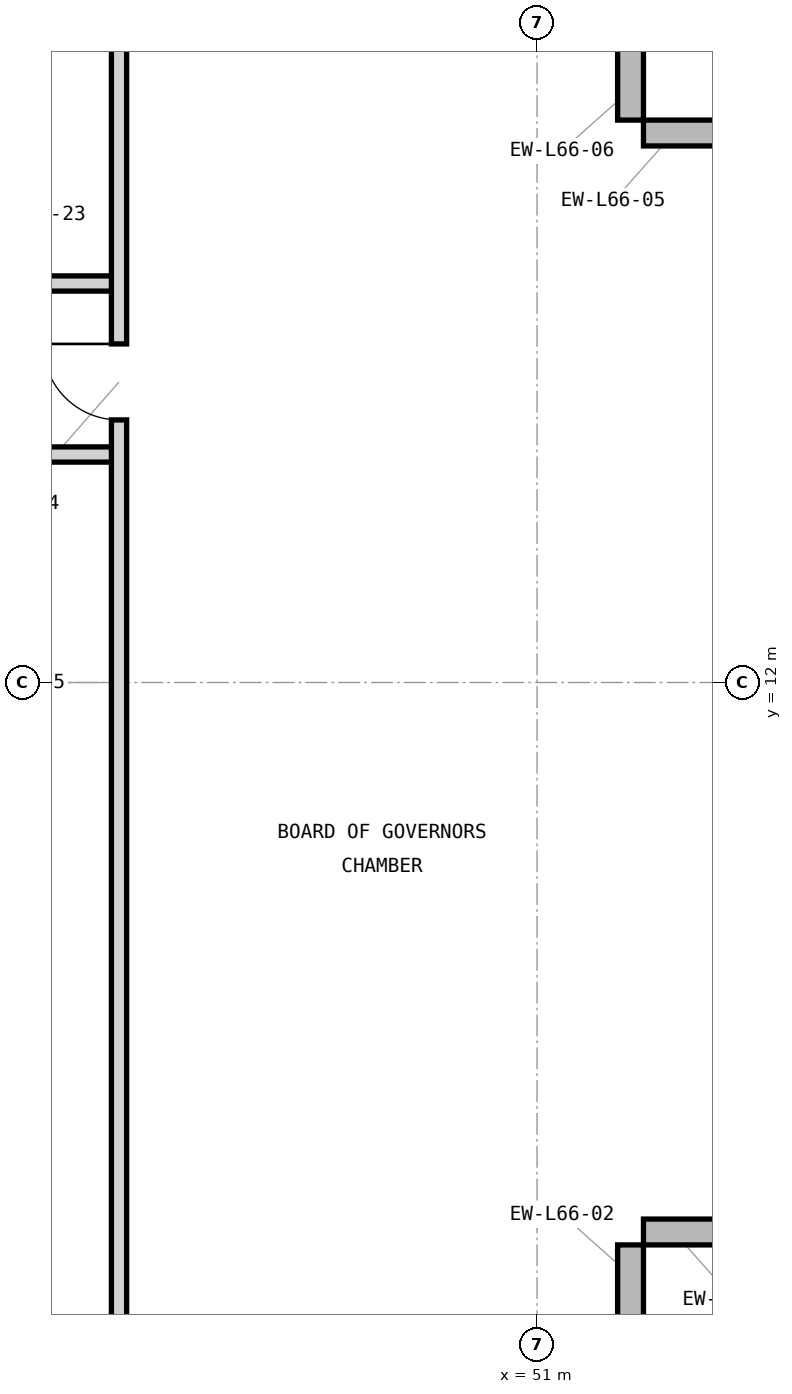
"""IFC4 building model, lengths in metres.
Left out: names, types, materials, properties, quantities, classifications, styles, units other than length and angle.
Written with IfcOpenShell. Run it as: python <this file> out.ifc"""

import sys

from ifc_helpers import new_model, si_unit, direction, frame, frame_2d, origin, place, context, subcontext, project, spatial, rectangle, extrude, element, fill, save


model = new_model("IFC4")
c1 = context("Model", 3, precision=1e-05, world=origin(), true_north=direction((0.0, 1.0)))
c2 = subcontext(c1, "Body", "Model", "MODEL_VIEW")
j1 = project(units=[si_unit("LENGTHUNIT", "METRE"), si_unit("PLANEANGLEUNIT", "RADIAN")], contexts=[c1])
p1 = place(None, origin())
s1 = spatial("IfcSite", under=j1, at=p1, CompositionType="ELEMENT")
p2 = place(p1, origin())
s2 = spatial("IfcBuilding", under=s1, at=p2, CompositionType="ELEMENT")
p3 = place(p2, frame((0.0, 0.0, 270.3)))
s3 = spatial("IfcBuildingStorey", under=s2, at=p3, CompositionType="ELEMENT", Elevation=270.3)
for number, where, z_axis, x_axis in (
    (1, (52.23, 3.0, 0.0), (0.0, 0.0, 1.0), (0.0, 1.0, 0.0)),
    (2, (52.4, 4.77, 0.0), (0.0, 0.0, 1.0), (1.0, 0.0, 0.0)),
    (3, (54.0, 19.23, 0.0), (0.0, 0.0, 1.0), (-1.0, 0.0, 0.0)),
    (4, (52.23, 19.4, 0.0), (0.0, 0.0, 1.0), (0.0, 1.0, 0.0)),
):
    element("IfcWall", number, at=place(p3, frame(where, z_axis=z_axis, x_axis=x_axis)), inside=s3, PredefinedType="STANDARD", context=c2, shape_type="SweptSolid", body=[
        extrude(rectangle(XDim=1.6, YDim=0.34, at=frame_2d((0.8, 0.0))), origin(), (0.0, 0.0, 1.0), 3.715),
    ])
p4 = place(p3, frame((37.7, 15.0, 0.0), z_axis=(0.0, 0.0, 1.0), x_axis=(1.0, 0.0, 0.0)))
e5 = element("IfcWall", 5, at=p4, inside=s3, PredefinedType="PARTITIONING", context=c2, shape_type="SweptSolid", body=[
    extrude(rectangle(XDim=7.8, YDim=0.2, at=frame_2d((3.9, 0.0))), origin(), (0.0, 0.0, 1.0), 3.301),
])
p5 = place(p4, frame((3.4, 0.0, 0.0)))
e6 = element("IfcOpeningElement", 6, at=p5, cuts=e5, PredefinedType="OPENING", context=c2, shape_type="SweptSolid", body=[
    extrude(rectangle(XDim=1.0, YDim=2.15, at=frame_2d((0.5, 1.075))), frame((0.0, 0.11, 0.0), z_axis=(0.0, -1.0, 0.0), x_axis=(1.0, 0.0, 0.0)), (0.0, 0.0, 1.0), 0.22),
])
p6 = place(p3, frame((40.2, 17.25, 0.0), z_axis=(0.0, 0.0, 1.0), x_axis=(1.0, 0.0, 0.0)))
e7 = element("IfcWall", 7, at=p6, inside=s3, PredefinedType="PARTITIONING", context=c2, shape_type="SweptSolid", body=[
    extrude(rectangle(XDim=5.3, YDim=0.2, at=frame_2d((2.65, 0.0))), origin(), (0.0, 0.0, 1.0), 3.705),
])
p7 = place(p6, frame((2.15, 0.0, 0.0)))
e8 = element("IfcOpeningElement", 8, at=p7, cuts=e7, PredefinedType="OPENING", context=c2, shape_type="SweptSolid", body=[
    extrude(rectangle(XDim=1.0, YDim=2.15, at=frame_2d((0.5, 1.075))), frame((0.0, 0.11, 0.0), z_axis=(0.0, -1.0, 0.0), x_axis=(1.0, 0.0, 0.0)), (0.0, 0.0, 1.0), 0.22),
])
p8 = place(p3, frame((45.5, 3.18, 0.0), z_axis=(0.0, 0.0, 1.0), x_axis=(0.0, 1.0, 0.0)))
e9 = element("IfcWall", 9, at=p8, inside=s3, PredefinedType="PARTITIONING", context=c2, shape_type="SweptSolid", body=[
    extrude(rectangle(XDim=17.64, YDim=0.2, at=frame_2d((8.82, 0.0))), origin(), (0.0, 0.0, 1.0), 3.705),
])
p9 = place(p8, frame((12.275, 0.0, 0.0)))
e10 = element("IfcOpeningElement", 10, at=p9, cuts=e9, PredefinedType="OPENING", context=c2, shape_type="SweptSolid", body=[
    extrude(rectangle(XDim=1.0, YDim=2.15, at=frame_2d((0.5, 1.075))), frame((0.0, 0.11, 0.0), z_axis=(0.0, -1.0, 0.0), x_axis=(1.0, 0.0, 0.0)), (0.0, 0.0, 1.0), 0.22),
])
p10 = place(p9, origin())
e11 = element("IfcDoor", 11, at=p10, inside=s3, OperationType="SINGLE_SWING_RIGHT", PredefinedType="DOOR", context=c2, shape_type="SweptSolid", body=[
    extrude(rectangle(XDim=1.0, YDim=2.15, at=frame_2d((0.5, 1.075))), frame((0.0, 0.025, 0.0), z_axis=(0.0, -1.0, 0.0), x_axis=(1.0, 0.0, 0.0)), (0.0, 0.0, 1.0), 0.05),
])
fill(e10, e11)
save(model, sys.argv[1])
